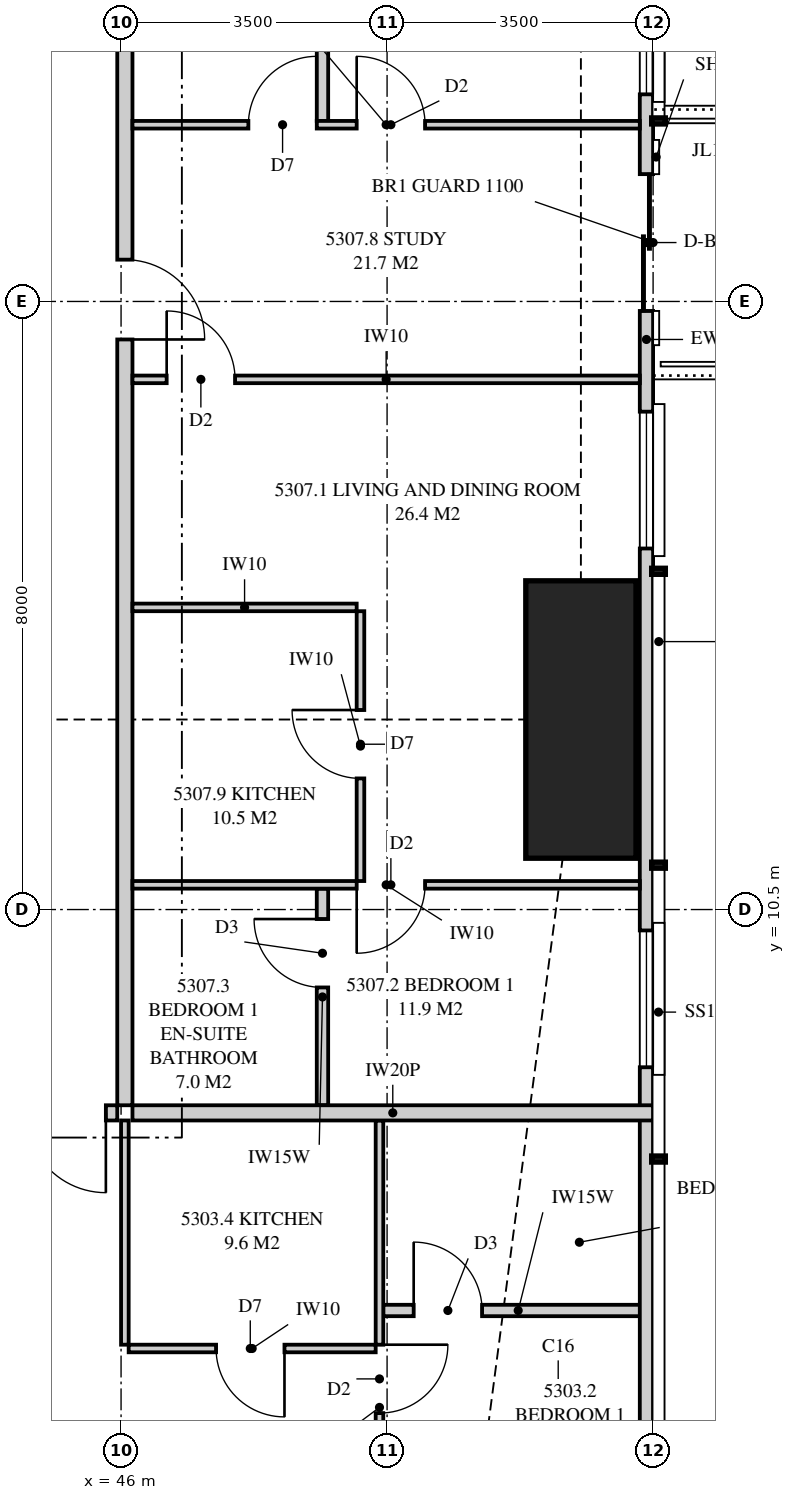
"""IFC4 building model, lengths in metres.
Left out: names, types, materials, properties, quantities, classifications, styles, units other than length and angle.
Written with IfcOpenShell. Run it as: python <this file> out.ifc"""

import sys

from ifc_helpers import new_model, si_unit, direction, frame, frame_2d, origin, origin_2d, place, context, subcontext, project, spatial, polyline, rectangle, outline, extrude, element, fill, save


model = new_model("IFC4")
c1 = context("Model", 3, precision=1e-05, world=origin(), true_north=direction((0.0, 1.0)))
c2 = subcontext(c1, "Body", "Model", "MODEL_VIEW")
j1 = project(units=[si_unit("LENGTHUNIT", "METRE"), si_unit("PLANEANGLEUNIT", "RADIAN")], contexts=[c1])
p1 = place(None, origin())
s1 = spatial("IfcSite", under=j1, at=p1, CompositionType="ELEMENT")
p2 = place(p1, origin())
s2 = spatial("IfcBuilding", under=s1, at=p2, CompositionType="ELEMENT")
p3 = place(p2, frame((0.0, 0.0, 194.55)))
s3 = spatial("IfcBuildingStorey", under=s2, at=p3, CompositionType="ELEMENT", Elevation=194.55)
p4 = place(p3, frame((52.05, 13.0, 0.0), z_axis=(0.0, 0.0, 1.0), x_axis=(1.0, 0.0, 0.0)))
e1 = element("IfcColumn", 1, at=p4, inside=s3, PredefinedType="COLUMN", context=c2, shape_type="SweptSolid", body=[
    extrude(rectangle(XDim=1.45, YDim=3.65, at=origin_2d()), origin(), (0.0, 0.0, 1.0), 3.35),
])
p5 = place(p3, frame((52.913, 3.051, 0.0), z_axis=(0.0, 0.0, 1.0), x_axis=(0.0, 1.0, 0.0)))
e2 = element("IfcWall", 2, at=p5, inside=s3, PredefinedType="SOLIDWALL", context=c2, shape_type="SweptSolid", body=[
    extrude(outline(polyline([(0.0, 0.0), (29.897, 0.0), (29.897, 3.11), (22.167, 3.11), (22.167, 2.15), (22.074, 2.15), (22.074, 3.11), (21.949, 3.11), (21.949, 2.15), (9.949, 2.15), (9.949, 3.11), (9.847, 3.11), (9.847, 2.15), (9.706, 2.15), (9.706, 3.11), (0.0, 3.11), (0.0, 0.0)])), frame((0.0, 0.087, 0.0), z_axis=(0.0, -1.0, 0.0), x_axis=(1.0, 0.0, 0.0)), (0.0, 0.0, 1.0), 0.175),
])
p6 = place(p5, frame((5.374, 0.0, 0.4)))
e3 = element("IfcOpeningElement", 3, at=p6, cuts=e2, PredefinedType="OPENING", context=c2, shape_type="SweptSolid", body=[
    extrude(rectangle(XDim=1.8, YDim=1.7, at=frame_2d((0.9, 0.85))), frame((0.0, 0.097, 0.0), z_axis=(0.0, -1.0, 0.0), x_axis=(1.0, 0.0, 0.0)), (0.0, 0.0, 1.0), 0.195),
])
p7 = place(p5, frame((12.199, 0.0, 0.4)))
e4 = element("IfcOpeningElement", 4, at=p7, cuts=e2, PredefinedType="OPENING", context=c2, shape_type="SweptSolid", body=[
    extrude(rectangle(XDim=1.8, YDim=1.7, at=frame_2d((0.9, 0.85))), frame((0.0, 0.097, 0.0), z_axis=(0.0, -1.0, 0.0), x_axis=(1.0, 0.0, 0.0)), (0.0, 0.0, 1.0), 0.195),
])
p8 = place(p5, frame((15.324, 0.0, 0.0)))
e5 = element("IfcOpeningElement", 5, at=p8, cuts=e2, PredefinedType="OPENING", context=c2, shape_type="SweptSolid", body=[
    extrude(rectangle(XDim=1.8, YDim=2.1, at=frame_2d((0.9, 1.05))), frame((0.0, 0.097, 0.0), z_axis=(0.0, -1.0, 0.0), x_axis=(1.0, 0.0, 0.0)), (0.0, 0.0, 1.0), 0.195),
])
p9 = place(p5, frame((18.174, 0.0, 0.4)))
e6 = element("IfcOpeningElement", 6, at=p9, cuts=e2, PredefinedType="OPENING", context=c2, shape_type="SweptSolid", body=[
    extrude(rectangle(XDim=1.8, YDim=1.7, at=frame_2d((0.9, 0.85))), frame((0.0, 0.097, 0.0), z_axis=(0.0, -1.0, 0.0), x_axis=(1.0, 0.0, 0.0)), (0.0, 0.0, 1.0), 0.195),
])
p10 = place(p5, frame((23.886, 0.0, 0.4)))
e7 = element("IfcOpeningElement", 7, at=p10, cuts=e2, PredefinedType="OPENING", context=c2, shape_type="SweptSolid", body=[
    extrude(rectangle(XDim=1.8, YDim=1.7, at=frame_2d((0.9, 0.85))), frame((0.0, 0.097, 0.0), z_axis=(0.0, -1.0, 0.0), x_axis=(1.0, 0.0, 0.0)), (0.0, 0.0, 1.0), 0.195),
])
p11 = place(p5, frame((26.871, 0.0, 0.4)))
e8 = element("IfcOpeningElement", 8, at=p11, cuts=e2, PredefinedType="OPENING", context=c2, shape_type="SweptSolid", body=[
    extrude(rectangle(XDim=1.8, YDim=1.7, at=frame_2d((0.9, 0.85))), frame((0.0, 0.097, 0.0), z_axis=(0.0, -1.0, 0.0), x_axis=(1.0, 0.0, 0.0)), (0.0, 0.0, 1.0), 0.195),
])
p12 = place(p3, frame((41.4, 7.825, 0.0), z_axis=(0.0, 0.0, 1.0), x_axis=(1.0, 0.0, 0.0)))
e9 = element("IfcWall", 9, at=p12, inside=s3, PredefinedType="PARTITIONING", context=c2, shape_type="SweptSolid", body=[
    extrude(outline(polyline([(0.0, 0.0), (4.55, 0.0), (4.55, 3.11), (1.688, 3.11), (1.688, 2.541), (1.013, 2.541), (1.013, 3.11), (0.0, 3.11), (0.0, 0.0)])), frame((0.0, 0.1, 0.0), z_axis=(0.0, -1.0, 0.0), x_axis=(1.0, 0.0, 0.0)), (0.0, 0.0, 1.0), 0.2),
])
p13 = place(p12, frame((3.35, 0.0, 0.0)))
e10 = element("IfcOpeningElement", 10, at=p13, cuts=e9, PredefinedType="OPENING", context=c2, shape_type="SweptSolid", body=[
    extrude(rectangle(XDim=1.05, YDim=2.2, at=frame_2d((0.525, 1.1))), frame((0.0, 0.11, 0.0), z_axis=(0.0, -1.0, 0.0), x_axis=(1.0, 0.0, 0.0)), (0.0, 0.0, 1.0), 0.22),
])
p14 = place(p3, frame((49.4, 0.175, 0.0), z_axis=(0.0, 0.0, 1.0), x_axis=(0.0, 1.0, 0.0)))
e11 = element("IfcWall", 11, at=p14, inside=s3, PredefinedType="PARTITIONING", context=c2, shape_type="SweptSolid", body=[
    extrude(outline(polyline([(0.0, 0.0), (7.55, 0.0), (7.55, 3.11), (2.825, 3.11), (2.825, 2.15), (1.079, 2.15), (1.079, 3.11), (0.0, 3.11), (0.0, 0.0)])), frame((0.0, 0.05, 0.0), z_axis=(0.0, -1.0, 0.0), x_axis=(1.0, 0.0, 0.0)), (0.0, 0.0, 1.0), 0.1),
])
p15 = place(p14, frame((3.7, 0.0, 0.0)))
e12 = element("IfcOpeningElement", 12, at=p15, cuts=e11, PredefinedType="OPENING", context=c2, shape_type="SweptSolid", body=[
    extrude(rectangle(XDim=0.9, YDim=2.1, at=frame_2d((0.45, 1.05))), frame((0.0, 0.06, 0.0), z_axis=(0.0, -1.0, 0.0), x_axis=(1.0, 0.0, 0.0)), (0.0, 0.0, 1.0), 0.12),
])
p16 = place(p3, frame((49.45, 5.225, 0.0), z_axis=(0.0, 0.0, 1.0), x_axis=(1.0, 0.0, 0.0)))
e13 = element("IfcWall", 13, at=p16, inside=s3, PredefinedType="PLUMBINGWALL", context=c2, shape_type="SweptSolid", body=[
    extrude(outline(polyline([(0.0, 0.0), (3.55, 0.0), (3.55, 3.11), (2.472, 3.11), (2.472, 2.15), (0.687, 2.15), (0.687, 3.11), (0.0, 3.11), (0.0, 0.0)])), frame((0.0, 0.075, 0.0), z_axis=(0.0, -1.0, 0.0), x_axis=(1.0, 0.0, 0.0)), (0.0, 0.0, 1.0), 0.15),
])
p17 = place(p16, frame((0.4, 0.0, 0.0)))
e14 = element("IfcOpeningElement", 14, at=p17, cuts=e13, PredefinedType="OPENING", context=c2, shape_type="SweptSolid", body=[
    extrude(rectangle(XDim=0.9, YDim=2.1, at=frame_2d((0.45, 1.05))), frame((0.0, 0.085, 0.0), z_axis=(0.0, -1.0, 0.0), x_axis=(1.0, 0.0, 0.0)), (0.0, 0.0, 1.0), 0.17),
])
p18 = place(p3, frame((46.1, 4.725, 0.0), z_axis=(0.0, 0.0, 1.0), x_axis=(1.0, 0.0, 0.0)))
e15 = element("IfcWall", 15, at=p18, inside=s3, PredefinedType="PARTITIONING", context=c2, shape_type="SweptSolid", body=[
    extrude(rectangle(XDim=3.25, YDim=0.1, at=frame_2d((1.625, 0.0))), origin(), (0.0, 0.0, 1.0), 3.11),
])
p19 = place(p18, frame((1.15, 0.0, 0.0)))
e16 = element("IfcOpeningElement", 16, at=p19, cuts=e15, PredefinedType="OPENING", context=c2, shape_type="SweptSolid", body=[
    extrude(rectangle(XDim=0.9, YDim=2.1, at=frame_2d((0.45, 1.05))), frame((0.0, 0.06, 0.0), z_axis=(0.0, -1.0, 0.0), x_axis=(1.0, 0.0, 0.0)), (0.0, 0.0, 1.0), 0.12),
])
p20 = place(p3, frame((46.05, 4.775, 0.0), z_axis=(0.0, 0.0, 1.0), x_axis=(0.0, 1.0, 0.0)))
e17 = element("IfcWall", 17, at=p20, inside=s3, PredefinedType="PARTITIONING", context=c2, shape_type="SweptSolid", body=[
    extrude(rectangle(XDim=2.95, YDim=0.1, at=frame_2d((1.475, 0.0))), origin(), (0.0, 0.0, 1.0), 3.11),
])
p21 = place(p3, frame((46.15, 7.825, 0.0), z_axis=(0.0, 0.0, 1.0), x_axis=(1.0, 0.0, 0.0)))
e18 = element("IfcWall", 18, at=p21, inside=s3, PredefinedType="PARTITIONING", context=c2, shape_type="SweptSolid", body=[
    extrude(outline(polyline([(0.0, 0.0), (6.85, 0.0), (6.85, 3.11), (6.138, 3.11), (6.138, 2.15), (4.303, 2.15), (4.303, 3.11), (0.0, 3.11), (0.0, 0.0)])), frame((0.0, 0.1, 0.0), z_axis=(0.0, -1.0, 0.0), x_axis=(1.0, 0.0, 0.0)), (0.0, 0.0, 1.0), 0.2),
])
p22 = place(p3, frame((46.05, 7.925, 0.0), z_axis=(0.0, 0.0, 1.0), x_axis=(0.0, 1.0, 0.0)))
e19 = element("IfcWall", 19, at=p22, inside=s3, PredefinedType="PARTITIONING", context=c2, shape_type="SweptSolid", body=[
    extrude(outline(polyline([(0.0, 0.0), (21.15, 0.0), (21.15, 3.11), (17.412, 3.11), (17.412, 2.541), (16.738, 2.541), (16.738, 3.11), (5.412, 3.11), (5.412, 2.541), (4.738, 2.541), (4.738, 3.11), (0.0, 3.11), (0.0, 0.0)])), frame((0.0, 0.1, 0.0), z_axis=(0.0, -1.0, 0.0), x_axis=(1.0, 0.0, 0.0)), (0.0, 0.0, 1.0), 0.2),
])
p23 = place(p22, frame((10.075, 0.0, 0.0)))
e20 = element("IfcOpeningElement", 20, at=p23, cuts=e19, PredefinedType="OPENING", context=c2, shape_type="SweptSolid", body=[
    extrude(rectangle(XDim=1.05, YDim=2.2, at=frame_2d((0.525, 1.1))), frame((0.0, 0.11, 0.0), z_axis=(0.0, -1.0, 0.0), x_axis=(1.0, 0.0, 0.0)), (0.0, 0.0, 1.0), 0.22),
])
p24 = place(p3, frame((52.825, 10.825, 0.0), z_axis=(0.0, 0.0, 1.0), x_axis=(-1.0, 0.0, 0.0)))
e21 = element("IfcWall", 21, at=p24, inside=s3, PredefinedType="PARTITIONING", context=c2, shape_type="SweptSolid", body=[
    extrude(outline(polyline([(0.0, 0.0), (6.675, 0.0), (6.675, 3.11), (1.928, 3.11), (1.928, 2.15), (0.193, 2.15), (0.193, 3.11), (0.0, 3.11), (0.0, 0.0)])), frame((0.0, 0.05, 0.0), z_axis=(0.0, -1.0, 0.0), x_axis=(1.0, 0.0, 0.0)), (0.0, 0.0, 1.0), 0.1),
])
p25 = place(p24, frame((2.825, 0.0, 0.0)))
e22 = element("IfcOpeningElement", 22, at=p25, cuts=e21, PredefinedType="OPENING", context=c2, shape_type="SweptSolid", body=[
    extrude(rectangle(XDim=0.9, YDim=2.1, at=frame_2d((0.45, 1.05))), frame((0.0, 0.06, 0.0), z_axis=(0.0, -1.0, 0.0), x_axis=(1.0, 0.0, 0.0)), (0.0, 0.0, 1.0), 0.12),
])
p26 = place(p3, frame((52.825, 20.825, 0.0), z_axis=(0.0, 0.0, 1.0), x_axis=(-1.0, 0.0, 0.0)))
e23 = element("IfcWall", 23, at=p26, inside=s3, PredefinedType="PARTITIONING", context=c2, shape_type="SweptSolid", body=[
    extrude(outline(polyline([(0.0, 0.0), (6.675, 0.0), (6.675, 3.11), (1.635, 3.11), (1.635, 2.15), (0.0, 2.15), (0.0, 3.11), (0.0, 0.0)])), frame((0.0, 0.05, 0.0), z_axis=(0.0, -1.0, 0.0), x_axis=(1.0, 0.0, 0.0)), (0.0, 0.0, 1.0), 0.1),
])
p27 = place(p26, frame((2.825, 0.0, 0.0)))
e24 = element("IfcOpeningElement", 24, at=p27, cuts=e23, PredefinedType="OPENING", context=c2, shape_type="SweptSolid", body=[
    extrude(rectangle(XDim=0.9, YDim=2.1, at=frame_2d((0.45, 1.05))), frame((0.0, 0.06, 0.0), z_axis=(0.0, -1.0, 0.0), x_axis=(1.0, 0.0, 0.0)), (0.0, 0.0, 1.0), 0.12),
])
p28 = place(p26, frame((4.25, 0.0, 0.0)))
e25 = element("IfcOpeningElement", 25, at=p28, cuts=e23, PredefinedType="OPENING", context=c2, shape_type="SweptSolid", body=[
    extrude(rectangle(XDim=0.9, YDim=2.1, at=frame_2d((0.45, 1.05))), frame((0.0, 0.06, 0.0), z_axis=(0.0, -1.0, 0.0), x_axis=(1.0, 0.0, 0.0)), (0.0, 0.0, 1.0), 0.12),
])
p29 = place(p3, frame((48.65, 7.925, 0.0), z_axis=(0.0, 0.0, 1.0), x_axis=(0.0, 1.0, 0.0)))
e26 = element("IfcWall", 26, at=p29, inside=s3, PredefinedType="PLUMBINGWALL", context=c2, shape_type="SweptSolid", body=[
    extrude(rectangle(XDim=2.85, YDim=0.15, at=frame_2d((1.425, 0.0))), origin(), (0.0, 0.0, 1.0), 3.11),
])
p30 = place(p29, frame((1.55, 0.0, 0.0)))
e27 = element("IfcOpeningElement", 27, at=p30, cuts=e26, PredefinedType="OPENING", context=c2, shape_type="SweptSolid", body=[
    extrude(rectangle(XDim=0.9, YDim=2.1, at=frame_2d((0.45, 1.05))), frame((0.0, 0.085, 0.0), z_axis=(0.0, -1.0, 0.0), x_axis=(1.0, 0.0, 0.0)), (0.0, 0.0, 1.0), 0.17),
])
p31 = place(p3, frame((48.65, 20.875, 0.0), z_axis=(0.0, 0.0, 1.0), x_axis=(0.0, 1.0, 0.0)))
e28 = element("IfcWall", 28, at=p31, inside=s3, PredefinedType="PLUMBINGWALL", context=c2, shape_type="SweptSolid", body=[
    extrude(outline(polyline([(0.0, 0.0), (4.9, 0.0), (4.9, 3.11), (4.438, 3.11), (4.438, 2.541), (3.812, 2.541), (3.812, 3.11), (0.0, 3.11), (0.0, 0.0)])), frame((0.0, 0.075, 0.0), z_axis=(0.0, -1.0, 0.0), x_axis=(1.0, 0.0, 0.0)), (0.0, 0.0, 1.0), 0.15),
])
p32 = place(p3, frame((52.825, 17.475, 0.0), z_axis=(0.0, 0.0, 1.0), x_axis=(-1.0, 0.0, 0.0)))
e29 = element("IfcWall", 29, at=p32, inside=s3, PredefinedType="PARTITIONING", context=c2, shape_type="SweptSolid", body=[
    extrude(outline(polyline([(0.0, 0.0), (6.675, 0.0), (6.675, 3.11), (1.635, 3.11), (1.635, 2.15), (0.0, 2.15), (0.0, 3.11), (0.0, 0.0)])), frame((0.0, 0.05, 0.0), z_axis=(0.0, -1.0, 0.0), x_axis=(1.0, 0.0, 0.0)), (0.0, 0.0, 1.0), 0.1),
])
p33 = place(p32, frame((5.325, 0.0, 0.0)))
e30 = element("IfcOpeningElement", 30, at=p33, cuts=e29, PredefinedType="OPENING", context=c2, shape_type="SweptSolid", body=[
    extrude(rectangle(XDim=0.9, YDim=2.1, at=frame_2d((0.45, 1.05))), frame((0.0, 0.06, 0.0), z_axis=(0.0, -1.0, 0.0), x_axis=(1.0, 0.0, 0.0)), (0.0, 0.0, 1.0), 0.12),
])
p34 = place(p3, frame((49.15, 10.875, 0.0), z_axis=(0.0, 0.0, 1.0), x_axis=(0.0, 1.0, 0.0)))
e31 = element("IfcWall", 31, at=p34, inside=s3, PredefinedType="PARTITIONING", context=c2, shape_type="SweptSolid", body=[
    extrude(outline(polyline([(0.0, 0.0), (3.55, 0.0), (3.55, 3.11), (2.412, 3.11), (2.412, 2.541), (1.838, 2.541), (1.838, 3.11), (0.0, 3.11), (0.0, 0.0)])), frame((0.0, 0.05, 0.0), z_axis=(0.0, -1.0, 0.0), x_axis=(1.0, 0.0, 0.0)), (0.0, 0.0, 1.0), 0.1),
])
p35 = place(p34, frame((1.35, 0.0, 0.0)))
e32 = element("IfcOpeningElement", 32, at=p35, cuts=e31, PredefinedType="OPENING", context=c2, shape_type="SweptSolid", body=[
    extrude(rectangle(XDim=0.9, YDim=2.1, at=frame_2d((0.45, 1.05))), frame((0.0, 0.06, 0.0), z_axis=(0.0, -1.0, 0.0), x_axis=(1.0, 0.0, 0.0)), (0.0, 0.0, 1.0), 0.12),
])
p36 = place(p3, frame((49.1, 14.475, 0.0), z_axis=(0.0, 0.0, 1.0), x_axis=(-1.0, 0.0, 0.0)))
e33 = element("IfcWall", 33, at=p36, inside=s3, PredefinedType="PARTITIONING", context=c2, shape_type="SweptSolid", body=[
    extrude(rectangle(XDim=2.95, YDim=0.1, at=frame_2d((1.475, 0.0))), origin(), (0.0, 0.0, 1.0), 3.11),
])
p37 = place(p6, origin())
e34 = element("IfcWindow", 34, at=p37, inside=s3, PartitioningType="SINGLE_PANEL", PredefinedType="WINDOW", context=c2, shape_type="SweptSolid", body=[
    extrude(rectangle(XDim=1.8, YDim=1.7, at=frame_2d((0.9, 0.85))), frame((0.0, 0.03, 0.0), z_axis=(0.0, -1.0, 0.0), x_axis=(1.0, 0.0, 0.0)), (0.0, 0.0, 1.0), 0.06),
])
fill(e3, e34)
p38 = place(p7, origin())
e35 = element("IfcWindow", 35, at=p38, inside=s3, PartitioningType="SINGLE_PANEL", PredefinedType="WINDOW", context=c2, shape_type="SweptSolid", body=[
    extrude(rectangle(XDim=1.8, YDim=1.7, at=frame_2d((0.9, 0.85))), frame((0.0, 0.03, 0.0), z_axis=(0.0, -1.0, 0.0), x_axis=(1.0, 0.0, 0.0)), (0.0, 0.0, 1.0), 0.06),
])
fill(e4, e35)
p39 = place(p8, origin())
e36 = element("IfcDoor", 36, at=p39, inside=s3, OperationType="SLIDING_TO_LEFT", PredefinedType="DOOR", context=c2, shape_type="SweptSolid", body=[
    extrude(rectangle(XDim=1.8, YDim=2.1, at=frame_2d((0.9, 1.05))), frame((0.0, 0.025, 0.0), z_axis=(0.0, -1.0, 0.0), x_axis=(1.0, 0.0, 0.0)), (0.0, 0.0, 1.0), 0.05),
])
fill(e5, e36)
p40 = place(p9, origin())
e37 = element("IfcWindow", 37, at=p40, inside=s3, PartitioningType="SINGLE_PANEL", PredefinedType="WINDOW", context=c2, shape_type="SweptSolid", body=[
    extrude(rectangle(XDim=1.8, YDim=1.7, at=frame_2d((0.9, 0.85))), frame((0.0, 0.03, 0.0), z_axis=(0.0, -1.0, 0.0), x_axis=(1.0, 0.0, 0.0)), (0.0, 0.0, 1.0), 0.06),
])
fill(e6, e37)
p41 = place(p13, frame((1.05, 0.0, 0.0), z_axis=(0.0, 0.0, 1.0), x_axis=(-1.0, 0.0, 0.0)))
e38 = element("IfcDoor", 38, at=p41, inside=s3, OperationType="SINGLE_SWING_LEFT", PredefinedType="DOOR", context=c2, shape_type="SweptSolid", body=[
    extrude(rectangle(XDim=1.05, YDim=2.2, at=frame_2d((0.525, 1.1))), frame((0.0, 0.025, 0.0), z_axis=(0.0, -1.0, 0.0), x_axis=(1.0, 0.0, 0.0)), (0.0, 0.0, 1.0), 0.05),
])
fill(e10, e38)
p42 = place(p15, frame((0.9, 0.0, 0.0), z_axis=(0.0, 0.0, 1.0), x_axis=(-1.0, 0.0, 0.0)))
e39 = element("IfcDoor", 39, at=p42, inside=s3, OperationType="SINGLE_SWING_LEFT", PredefinedType="DOOR", context=c2, shape_type="SweptSolid", body=[
    extrude(rectangle(XDim=0.9, YDim=2.1, at=frame_2d((0.45, 1.05))), frame((0.0, 0.025, 0.0), z_axis=(0.0, -1.0, 0.0), x_axis=(1.0, 0.0, 0.0)), (0.0, 0.0, 1.0), 0.05),
])
fill(e12, e39)
p43 = place(p17, origin())
e40 = element("IfcDoor", 40, at=p43, inside=s3, OperationType="SINGLE_SWING_LEFT", PredefinedType="DOOR", context=c2, shape_type="SweptSolid", body=[
    extrude(rectangle(XDim=0.9, YDim=2.1, at=frame_2d((0.45, 1.05))), frame((0.0, 0.025, 0.0), z_axis=(0.0, -1.0, 0.0), x_axis=(1.0, 0.0, 0.0)), (0.0, 0.0, 1.0), 0.05),
])
fill(e14, e40)
p44 = place(p19, frame((0.9, 0.0, 0.0), z_axis=(0.0, 0.0, 1.0), x_axis=(-1.0, 0.0, 0.0)))
e41 = element("IfcDoor", 41, at=p44, inside=s3, OperationType="SINGLE_SWING_LEFT", PredefinedType="DOOR", context=c2, shape_type="SweptSolid", body=[
    extrude(rectangle(XDim=0.9, YDim=2.1, at=frame_2d((0.45, 1.05))), frame((0.0, 0.025, 0.0), z_axis=(0.0, -1.0, 0.0), x_axis=(1.0, 0.0, 0.0)), (0.0, 0.0, 1.0), 0.05),
])
fill(e16, e41)
p45 = place(p23, frame((1.05, 0.0, 0.0), z_axis=(0.0, 0.0, 1.0), x_axis=(-1.0, 0.0, 0.0)))
e42 = element("IfcDoor", 42, at=p45, inside=s3, OperationType="SINGLE_SWING_RIGHT", PredefinedType="DOOR", context=c2, shape_type="SweptSolid", body=[
    extrude(rectangle(XDim=1.05, YDim=2.2, at=frame_2d((0.525, 1.1))), frame((0.0, 0.025, 0.0), z_axis=(0.0, -1.0, 0.0), x_axis=(1.0, 0.0, 0.0)), (0.0, 0.0, 1.0), 0.05),
])
fill(e20, e42)
p46 = place(p25, origin())
e43 = element("IfcDoor", 43, at=p46, inside=s3, OperationType="SINGLE_SWING_RIGHT", PredefinedType="DOOR", context=c2, shape_type="SweptSolid", body=[
    extrude(rectangle(XDim=0.9, YDim=2.1, at=frame_2d((0.45, 1.05))), frame((0.0, 0.025, 0.0), z_axis=(0.0, -1.0, 0.0), x_axis=(1.0, 0.0, 0.0)), (0.0, 0.0, 1.0), 0.05),
])
fill(e22, e43)
p47 = place(p30, origin())
e44 = element("IfcDoor", 44, at=p47, inside=s3, OperationType="SINGLE_SWING_RIGHT", PredefinedType="DOOR", context=c2, shape_type="SweptSolid", body=[
    extrude(rectangle(XDim=0.9, YDim=2.1, at=frame_2d((0.45, 1.05))), frame((0.0, 0.025, 0.0), z_axis=(0.0, -1.0, 0.0), x_axis=(1.0, 0.0, 0.0)), (0.0, 0.0, 1.0), 0.05),
])
fill(e27, e44)
p48 = place(p27, frame((0.9, 0.0, 0.0), z_axis=(0.0, 0.0, 1.0), x_axis=(-1.0, 0.0, 0.0)))
e45 = element("IfcDoor", 45, at=p48, inside=s3, OperationType="SINGLE_SWING_LEFT", PredefinedType="DOOR", context=c2, shape_type="SweptSolid", body=[
    extrude(rectangle(XDim=0.9, YDim=2.1, at=frame_2d((0.45, 1.05))), frame((0.0, 0.025, 0.0), z_axis=(0.0, -1.0, 0.0), x_axis=(1.0, 0.0, 0.0)), (0.0, 0.0, 1.0), 0.05),
])
fill(e24, e45)
p49 = place(p28, frame((0.9, 0.0, 0.0), z_axis=(0.0, 0.0, 1.0), x_axis=(-1.0, 0.0, 0.0)))
e46 = element("IfcDoor", 46, at=p49, inside=s3, OperationType="SINGLE_SWING_RIGHT", PredefinedType="DOOR", context=c2, shape_type="SweptSolid", body=[
    extrude(rectangle(XDim=0.9, YDim=2.1, at=frame_2d((0.45, 1.05))), frame((0.0, 0.025, 0.0), z_axis=(0.0, -1.0, 0.0), x_axis=(1.0, 0.0, 0.0)), (0.0, 0.0, 1.0), 0.05),
])
fill(e25, e46)
p50 = place(p33, frame((0.9, 0.0, 0.0), z_axis=(0.0, 0.0, 1.0), x_axis=(-1.0, 0.0, 0.0)))
e47 = element("IfcDoor", 47, at=p50, inside=s3, OperationType="SINGLE_SWING_LEFT", PredefinedType="DOOR", context=c2, shape_type="SweptSolid", body=[
    extrude(rectangle(XDim=0.9, YDim=2.1, at=frame_2d((0.45, 1.05))), frame((0.0, 0.025, 0.0), z_axis=(0.0, -1.0, 0.0), x_axis=(1.0, 0.0, 0.0)), (0.0, 0.0, 1.0), 0.05),
])
fill(e30, e47)
p51 = place(p35, origin())
e48 = element("IfcDoor", 48, at=p51, inside=s3, OperationType="SINGLE_SWING_RIGHT", PredefinedType="DOOR", context=c2, shape_type="SweptSolid", body=[
    extrude(rectangle(XDim=0.9, YDim=2.1, at=frame_2d((0.45, 1.05))), frame((0.0, 0.025, 0.0), z_axis=(0.0, -1.0, 0.0), x_axis=(1.0, 0.0, 0.0)), (0.0, 0.0, 1.0), 0.05),
])
fill(e32, e48)
save(model, sys.argv[1])
